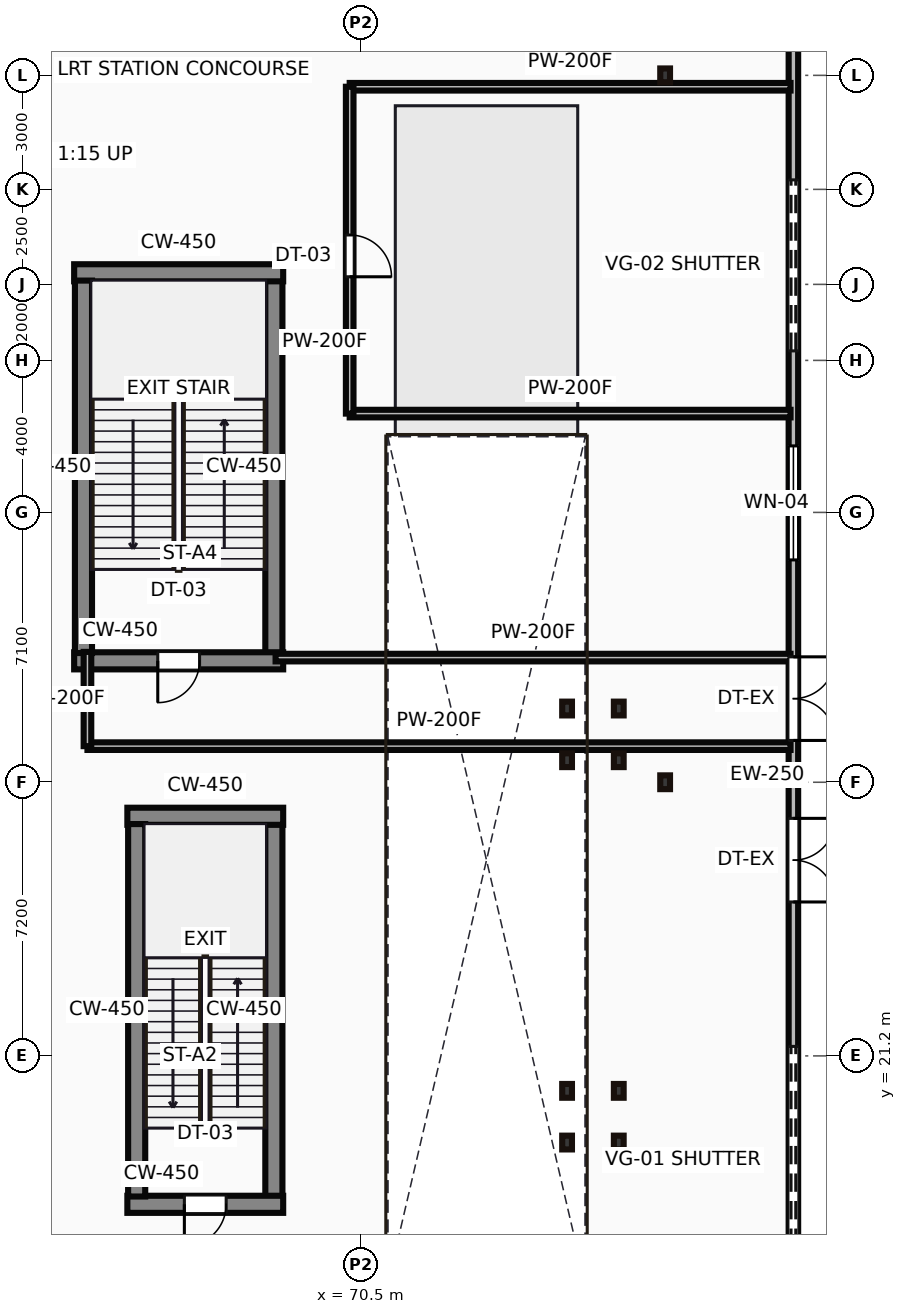
"""IFC4 building model, lengths in metres.
Left out: names, types, materials, properties, quantities, classifications, styles, units other than length and angle.
Written with IfcOpenShell. Run it as: python <this file> out.ifc"""

import sys

from ifc_helpers import new_model, si_unit, direction, frame, frame_2d, origin, origin_2d, place, context, subcontext, project, spatial, rectangle, i_section, extrude, source, transform, mapped, element, fill, save


model = new_model("IFC4")
c1 = context("Model", 3, precision=1e-05, world=origin(), true_north=direction((0.0, 1.0)))
c2 = subcontext(c1, "Body", "Model", "MODEL_VIEW")
j1 = project(units=[si_unit("LENGTHUNIT", "METRE"), si_unit("PLANEANGLEUNIT", "RADIAN")], contexts=[c1])
p1 = place(None, origin())
s1 = spatial("IfcSite", under=j1, at=p1, CompositionType="ELEMENT")
p2 = place(p1, origin())
s2 = spatial("IfcBuilding", under=s1, at=p2, CompositionType="ELEMENT")
p3 = place(p2, origin())
s3 = spatial("IfcBuildingStorey", under=s2, at=p3, CompositionType="ELEMENT", Elevation=0.0)
m1 = source(origin(), c2, "Body", "SweptSolid", [
    extrude(i_section(OverallWidth=0.257, OverallDepth=0.363, WebThickness=0.013, FlangeThickness=0.022, at=origin_2d()), origin(), (0.0, 0.0, 1.0), 6.0),
])
for number, where, z_axis, x_axis in (
    (1, (78.5, 28.4, 0.0), (0.0, 0.0, 1.0), (1.0, 0.0, 0.0)),
    (2, (78.5, 47.0, 0.0), (0.0, 0.0, 1.0), (1.0, 0.0, 0.0)),
):
    element("IfcColumn", number, at=place(p3, frame(where, z_axis=z_axis, x_axis=x_axis)), inside=s3, PredefinedType="COLUMN", context=c2, shape_type="MappedRepresentation", body=[
        mapped(m1, transform((0.0, 0.0, 0.0))),
    ])
m2 = source(origin(), c2, "Body", "SweptSolid", [
    extrude(rectangle(XDim=55.5, YDim=0.25, at=frame_2d((27.75, 0.0))), origin(), (0.0, 0.0, 1.0), 5.7),
])
p4 = place(p3, frame((81.875, 0.25, 0.0), z_axis=(0.0, 0.0, 1.0), x_axis=(0.0, 1.0, 0.0)))
e3 = element("IfcWall", 3, at=p4, inside=s3, PredefinedType="STANDARD", context=c2, shape_type="MappedRepresentation", body=[
    mapped(m2, transform((0.0, 0.0, 0.0))),
])
p5 = place(p4, frame((3.2, 0.0, 0.0)))
e4 = element("IfcOpeningElement", 4, at=p5, cuts=e3, PredefinedType="OPENING", context=c2, shape_type="SweptSolid", body=[
    extrude(rectangle(XDim=2.2, YDim=2.4, at=frame_2d((1.1, 1.2))), frame((0.0, 0.135, 0.0), z_axis=(0.0, -1.0, 0.0), x_axis=(1.0, 0.0, 0.0)), (0.0, 0.0, 1.0), 0.27),
])
p6 = place(p4, frame((7.0, 0.0, 0.0)))
e5 = element("IfcOpeningElement", 5, at=p6, cuts=e3, PredefinedType="OPENING", context=c2, shape_type="SweptSolid", body=[
    extrude(rectangle(XDim=2.2, YDim=2.4, at=frame_2d((1.1, 1.2))), frame((0.0, 0.135, 0.0), z_axis=(0.0, -1.0, 0.0), x_axis=(1.0, 0.0, 0.0)), (0.0, 0.0, 1.0), 0.27),
])
p7 = place(p4, frame((11.8, 0.0, 0.0)))
e6 = element("IfcOpeningElement", 6, at=p7, cuts=e3, PredefinedType="OPENING", context=c2, shape_type="SweptSolid", body=[
    extrude(rectangle(XDim=2.2, YDim=2.4, at=frame_2d((1.1, 1.2))), frame((0.0, 0.135, 0.0), z_axis=(0.0, -1.0, 0.0), x_axis=(1.0, 0.0, 0.0)), (0.0, 0.0, 1.0), 0.27),
])
p8 = place(p4, frame((25.0, 0.0, 0.0)))
e7 = element("IfcOpeningElement", 7, at=p8, cuts=e3, PredefinedType="OPENING", context=c2, shape_type="SweptSolid", body=[
    extrude(rectangle(XDim=2.2, YDim=2.4, at=frame_2d((1.1, 1.2))), frame((0.0, 0.135, 0.0), z_axis=(0.0, -1.0, 0.0), x_axis=(1.0, 0.0, 0.0)), (0.0, 0.0, 1.0), 0.27),
])
p9 = place(p4, frame((29.25, 0.0, 0.0)))
e8 = element("IfcOpeningElement", 8, at=p9, cuts=e3, PredefinedType="OPENING", context=c2, shape_type="SweptSolid", body=[
    extrude(rectangle(XDim=2.2, YDim=2.4, at=frame_2d((1.1, 1.2))), frame((0.0, 0.135, 0.0), z_axis=(0.0, -1.0, 0.0), x_axis=(1.0, 0.0, 0.0)), (0.0, 0.0, 1.0), 0.27),
])
p10 = place(p4, frame((47.6, 0.0, 0.0)))
e9 = element("IfcOpeningElement", 9, at=p10, cuts=e3, PredefinedType="OPENING", context=c2, shape_type="SweptSolid", body=[
    extrude(rectangle(XDim=2.2, YDim=2.4, at=frame_2d((1.1, 1.2))), frame((0.0, 0.135, 0.0), z_axis=(0.0, -1.0, 0.0), x_axis=(1.0, 0.0, 0.0)), (0.0, 0.0, 1.0), 0.27),
])
p11 = place(p4, frame((51.2, 0.0, 0.0)))
e10 = element("IfcOpeningElement", 10, at=p11, cuts=e3, PredefinedType="OPENING", context=c2, shape_type="SweptSolid", body=[
    extrude(rectangle(XDim=2.2, YDim=2.4, at=frame_2d((1.1, 1.2))), frame((0.0, 0.135, 0.0), z_axis=(0.0, -1.0, 0.0), x_axis=(1.0, 0.0, 0.0)), (0.0, 0.0, 1.0), 0.27),
])
p12 = place(p4, frame((15.2, 0.0, 0.0)))
e11 = element("IfcOpeningElement", 11, at=p12, cuts=e3, PredefinedType="OPENING", context=c2, shape_type="SweptSolid", body=[
    extrude(rectangle(XDim=6.0, YDim=4.5, at=frame_2d((3.0, 2.25))), frame((0.0, 0.135, 0.0), z_axis=(0.0, -1.0, 0.0), x_axis=(1.0, 0.0, 0.0)), (0.0, 0.0, 1.0), 0.27),
])
p13 = place(p4, frame((39.5, 0.0, 0.0)))
e12 = element("IfcOpeningElement", 12, at=p13, cuts=e3, PredefinedType="OPENING", context=c2, shape_type="SweptSolid", body=[
    extrude(rectangle(XDim=4.5, YDim=4.2, at=frame_2d((2.25, 2.1))), frame((0.0, 0.135, 0.0), z_axis=(0.0, -1.0, 0.0), x_axis=(1.0, 0.0, 0.0)), (0.0, 0.0, 1.0), 0.27),
])
p14 = place(p4, frame((34.0, 0.0, 0.9)))
e13 = element("IfcOpeningElement", 13, at=p14, cuts=e3, PredefinedType="OPENING", context=c2, shape_type="SweptSolid", body=[
    extrude(rectangle(XDim=3.0, YDim=2.4, at=frame_2d((1.5, 1.2))), frame((0.0, 0.135, 0.0), z_axis=(0.0, -1.0, 0.0), x_axis=(1.0, 0.0, 0.0)), (0.0, 0.0, 1.0), 0.27),
])
m3 = source(origin(), c2, "Body", "SweptSolid", [
    extrude(rectangle(XDim=4.1, YDim=0.45, at=frame_2d((2.05, 0.0))), origin(), (0.0, 0.0, 1.0), 6.0),
])
p15 = place(p3, frame((64.35, 17.295, 0.0), z_axis=(0.0, 0.0, 1.0), x_axis=(1.0, 0.0, 0.0)))
e14 = element("IfcWall", 14, at=p15, inside=s3, PredefinedType="SHEAR", context=c2, shape_type="MappedRepresentation", body=[
    mapped(m3, transform((0.0, 0.0, 0.0))),
])
p16 = place(p15, frame((1.5, 0.0, 0.0)))
e15 = element("IfcOpeningElement", 15, at=p16, cuts=e14, PredefinedType="OPENING", context=c2, shape_type="SweptSolid", body=[
    extrude(rectangle(XDim=1.1, YDim=2.15, at=frame_2d((0.55, 1.075))), frame((0.0, 0.235, 0.0), z_axis=(0.0, -1.0, 0.0), x_axis=(1.0, 0.0, 0.0)), (0.0, 0.0, 1.0), 0.47),
])
m4 = source(origin(), c2, "Body", "SweptSolid", [
    extrude(rectangle(XDim=9.8, YDim=0.45, at=frame_2d((4.9, 0.0))), origin(), (0.0, 0.0, 1.0), 6.0),
])
for number, where, z_axis, x_axis in (
    (16, (64.595, 17.5, 0.0), (0.0, 0.0, 1.0), (0.0, 1.0, 0.0)),
    (17, (68.205, 17.5, 0.0), (0.0, 0.0, 1.0), (0.0, 1.0, 0.0)),
):
    element("IfcWall", number, at=place(p3, frame(where, z_axis=z_axis, x_axis=x_axis)), inside=s3, PredefinedType="SHEAR", context=c2, shape_type="MappedRepresentation", body=[
        mapped(m4, transform((0.0, 0.0, 0.0))),
    ])
p17 = place(p3, frame((64.35, 27.505, 0.0), z_axis=(0.0, 0.0, 1.0), x_axis=(1.0, 0.0, 0.0)))
e18 = element("IfcWall", 18, at=p17, inside=s3, PredefinedType="SHEAR", context=c2, shape_type="MappedRepresentation", body=[
    mapped(m3, transform((0.0, 0.0, 0.0))),
])
m5 = source(origin(), c2, "Body", "SweptSolid", [
    extrude(rectangle(XDim=5.5, YDim=0.45, at=frame_2d((2.75, 0.0))), origin(), (0.0, 0.0, 1.0), 6.0),
])
p18 = place(p3, frame((62.95, 31.595, 0.0), z_axis=(0.0, 0.0, 1.0), x_axis=(1.0, 0.0, 0.0)))
e19 = element("IfcWall", 19, at=p18, inside=s3, PredefinedType="SHEAR", context=c2, shape_type="MappedRepresentation", body=[
    mapped(m5, transform((0.0, 0.0, 0.0))),
])
p19 = place(p18, frame((2.2, 0.0, 0.0)))
e20 = element("IfcOpeningElement", 20, at=p19, cuts=e19, PredefinedType="OPENING", context=c2, shape_type="SweptSolid", body=[
    extrude(rectangle(XDim=1.1, YDim=2.15, at=frame_2d((0.55, 1.075))), frame((0.0, 0.235, 0.0), z_axis=(0.0, -1.0, 0.0), x_axis=(1.0, 0.0, 0.0)), (0.0, 0.0, 1.0), 0.47),
])
for number, where, z_axis, x_axis in (
    (21, (63.195, 31.8, 0.0), (0.0, 0.0, 1.0), (0.0, 1.0, 0.0)),
    (22, (68.205, 31.8, 0.0), (0.0, 0.0, 1.0), (0.0, 1.0, 0.0)),
):
    element("IfcWall", number, at=place(p3, frame(where, z_axis=z_axis, x_axis=x_axis)), inside=s3, PredefinedType="SHEAR", context=c2, shape_type="MappedRepresentation", body=[
        mapped(m4, transform((0.0, 0.0, 0.0))),
    ])
p20 = place(p3, frame((62.95, 41.805, 0.0), z_axis=(0.0, 0.0, 1.0), x_axis=(1.0, 0.0, 0.0)))
e23 = element("IfcWall", 23, at=p20, inside=s3, PredefinedType="SHEAR", context=c2, shape_type="MappedRepresentation", body=[
    mapped(m5, transform((0.0, 0.0, 0.0))),
])
m6 = source(origin(), c2, "Body", "SweptSolid", [
    extrude(i_section(OverallWidth=0.257, OverallDepth=0.363, WebThickness=0.013, FlangeThickness=0.022, at=origin_2d()), origin(), (0.0, 0.0, 1.0), 5.8),
])
for number, where, z_axis, x_axis in (
    (24, (75.92, 18.92, 0.0), (0.0, 0.0, 1.0), (1.0, 0.0, 0.0)),
    (25, (75.92, 20.28, 0.0), (0.0, 0.0, 1.0), (1.0, 0.0, 0.0)),
    (26, (77.28, 18.92, 0.0), (0.0, 0.0, 1.0), (1.0, 0.0, 0.0)),
    (27, (77.28, 20.28, 0.0), (0.0, 0.0, 1.0), (1.0, 0.0, 0.0)),
):
    element("IfcColumn", number, at=place(p3, frame(where, z_axis=z_axis, x_axis=x_axis)), inside=s3, PredefinedType="COLUMN", context=c2, shape_type="MappedRepresentation", body=[
        mapped(m6, transform((0.0, 0.0, 0.0))),
    ])
for number, where, z_axis, x_axis in (
    (28, (75.92, 28.98, 0.0), (0.0, 0.0, 1.0), (1.0, 0.0, 0.0)),
    (29, (75.92, 30.34, 0.0), (0.0, 0.0, 1.0), (1.0, 0.0, 0.0)),
    (30, (77.28, 28.98, 0.0), (0.0, 0.0, 1.0), (1.0, 0.0, 0.0)),
    (31, (77.28, 30.34, 0.0), (0.0, 0.0, 1.0), (1.0, 0.0, 0.0)),
):
    element("IfcColumn", number, at=place(p3, frame(where, z_axis=z_axis, x_axis=x_axis)), inside=s3, PredefinedType="COLUMN", context=c2, shape_type="MappedRepresentation", body=[
        mapped(m1, transform((0.0, 0.0, 0.0))),
    ])
m7 = source(origin(), c2, "Body", "SweptSolid", [
    extrude(rectangle(XDim=18.5, YDim=0.2, at=frame_2d((9.25, 0.0))), origin(), (0.0, 0.0, 1.0), 5.7),
])
p21 = place(p3, frame((63.3, 29.35, 0.0), z_axis=(0.0, 0.0, 1.0), x_axis=(1.0, 0.0, 0.0)))
e32 = element("IfcWall", 32, at=p21, inside=s3, PredefinedType="PARTITIONING", context=c2, shape_type="MappedRepresentation", body=[
    mapped(m7, transform((0.0, 0.0, 0.0))),
])
m8 = source(origin(), c2, "Body", "SweptSolid", [
    extrude(rectangle(XDim=2.48, YDim=0.2, at=frame_2d((1.24, 0.0))), origin(), (0.0, 0.0, 1.0), 5.7),
])
p22 = place(p3, frame((63.3, 29.35, 0.0), z_axis=(0.0, 0.0, 1.0), x_axis=(0.0, 1.0, 0.0)))
e33 = element("IfcWall", 33, at=p22, inside=s3, PredefinedType="PARTITIONING", context=c2, shape_type="MappedRepresentation", body=[
    mapped(m8, transform((0.0, 0.0, 0.0))),
])
m9 = source(origin(), c2, "Body", "SweptSolid", [
    extrude(rectangle(XDim=13.55, YDim=0.2, at=frame_2d((6.775, 0.0))), origin(), (0.0, 0.0, 1.0), 5.7),
])
p23 = place(p3, frame((68.25, 31.68, 0.0), z_axis=(0.0, 0.0, 1.0), x_axis=(1.0, 0.0, 0.0)))
e34 = element("IfcWall", 34, at=p23, inside=s3, PredefinedType="PARTITIONING", context=c2, shape_type="MappedRepresentation", body=[
    mapped(m9, transform((0.0, 0.0, 0.0))),
])
m10 = source(origin(), c2, "Body", "SweptSolid", [
    extrude(rectangle(XDim=8.6, YDim=0.2, at=frame_2d((4.3, 0.0))), origin(), (0.0, 0.0, 1.0), 5.7),
])
p24 = place(p3, frame((70.2, 38.1, 0.0), z_axis=(0.0, 0.0, 1.0), x_axis=(0.0, 1.0, 0.0)))
e35 = element("IfcWall", 35, at=p24, inside=s3, PredefinedType="PARTITIONING", context=c2, shape_type="MappedRepresentation", body=[
    mapped(m10, transform((0.0, 0.0, 0.0))),
])
p25 = place(p24, frame((3.6, 0.0, 0.0)))
e36 = element("IfcOpeningElement", 36, at=p25, cuts=e35, PredefinedType="OPENING", context=c2, shape_type="SweptSolid", body=[
    extrude(rectangle(XDim=1.1, YDim=2.15, at=frame_2d((0.55, 1.075))), frame((0.0, 0.11, 0.0), z_axis=(0.0, -1.0, 0.0), x_axis=(1.0, 0.0, 0.0)), (0.0, 0.0, 1.0), 0.22),
])
m11 = source(origin(), c2, "Body", "SweptSolid", [
    extrude(rectangle(XDim=11.6, YDim=0.2, at=frame_2d((5.8, 0.0))), origin(), (0.0, 0.0, 1.0), 5.7),
])
for number, where, z_axis, x_axis in (
    (37, (70.2, 38.1, 0.0), (0.0, 0.0, 1.0), (1.0, 0.0, 0.0)),
    (38, (70.2, 46.7, 0.0), (0.0, 0.0, 1.0), (1.0, 0.0, 0.0)),
):
    element("IfcWall", number, at=place(p3, frame(where, z_axis=z_axis, x_axis=x_axis)), inside=s3, PredefinedType="PARTITIONING", context=c2, shape_type="MappedRepresentation", body=[
        mapped(m11, transform((0.0, 0.0, 0.0))),
    ])
m12 = source(origin(), c2, "Body", "SweptSolid", [
    extrude(rectangle(XDim=2.2, YDim=2.4, at=frame_2d((1.1, 1.2))), frame((0.0, 0.025, 0.0), z_axis=(0.0, -1.0, 0.0), x_axis=(1.0, 0.0, 0.0)), (0.0, 0.0, 1.0), 0.05),
])
p26 = place(p8, frame((2.2, 0.0, 0.0), z_axis=(0.0, 0.0, 1.0), x_axis=(-1.0, 0.0, 0.0)))
e39 = element("IfcDoor", 39, at=p26, inside=s3, OperationType="DOUBLE_DOOR_SINGLE_SWING", PredefinedType="DOOR", context=c2, shape_type="MappedRepresentation", body=[
    mapped(m12, transform((0.0, 0.0, 0.0))),
])
fill(e7, e39)
p27 = place(p9, frame((2.2, 0.0, 0.0), z_axis=(0.0, 0.0, 1.0), x_axis=(-1.0, 0.0, 0.0)))
e40 = element("IfcDoor", 40, at=p27, inside=s3, OperationType="DOUBLE_DOOR_SINGLE_SWING", PredefinedType="DOOR", context=c2, shape_type="MappedRepresentation", body=[
    mapped(m12, transform((0.0, 0.0, 0.0))),
])
fill(e8, e40)
m13 = source(origin(), c2, "Body", "SweptSolid", [
    extrude(rectangle(XDim=6.0, YDim=4.5, at=frame_2d((3.0, 2.25))), frame((0.0, 0.025, 0.0), z_axis=(0.0, -1.0, 0.0), x_axis=(1.0, 0.0, 0.0)), (0.0, 0.0, 1.0), 0.05),
])
p28 = place(p12, frame((6.0, 0.0, 0.0), z_axis=(0.0, 0.0, 1.0), x_axis=(-1.0, 0.0, 0.0)))
e41 = element("IfcDoor", 41, at=p28, inside=s3, OperationType="ROLLINGUP", PredefinedType="GATE", context=c2, shape_type="MappedRepresentation", body=[
    mapped(m13, transform((0.0, 0.0, 0.0))),
])
fill(e11, e41)
m14 = source(origin(), c2, "Body", "SweptSolid", [
    extrude(rectangle(XDim=4.5, YDim=4.2, at=frame_2d((2.25, 2.1))), frame((0.0, 0.025, 0.0), z_axis=(0.0, -1.0, 0.0), x_axis=(1.0, 0.0, 0.0)), (0.0, 0.0, 1.0), 0.05),
])
p29 = place(p13, frame((4.5, 0.0, 0.0), z_axis=(0.0, 0.0, 1.0), x_axis=(-1.0, 0.0, 0.0)))
e42 = element("IfcDoor", 42, at=p29, inside=s3, OperationType="ROLLINGUP", PredefinedType="GATE", context=c2, shape_type="MappedRepresentation", body=[
    mapped(m14, transform((0.0, 0.0, 0.0))),
])
fill(e12, e42)
m15 = source(origin(), c2, "Body", "SweptSolid", [
    extrude(rectangle(XDim=3.0, YDim=2.4, at=frame_2d((1.5, 1.2))), frame((0.0, 0.03, 0.0), z_axis=(0.0, -1.0, 0.0), x_axis=(1.0, 0.0, 0.0)), (0.0, 0.0, 1.0), 0.06),
])
p30 = place(p14, origin())
e43 = element("IfcWindow", 43, at=p30, inside=s3, PartitioningType="SINGLE_PANEL", PredefinedType="WINDOW", context=c2, shape_type="MappedRepresentation", body=[
    mapped(m15, transform((0.0, 0.0, 0.0))),
])
fill(e13, e43)
m16 = source(origin(), c2, "Body", "SweptSolid", [
    extrude(rectangle(XDim=1.1, YDim=2.15, at=frame_2d((0.55, 1.075))), frame((0.0, 0.025, 0.0), z_axis=(0.0, -1.0, 0.0), x_axis=(1.0, 0.0, 0.0)), (0.0, 0.0, 1.0), 0.05),
])
p31 = place(p25, frame((1.1, 0.0, 0.0), z_axis=(0.0, 0.0, 1.0), x_axis=(-1.0, 0.0, 0.0)))
e44 = element("IfcDoor", 44, at=p31, inside=s3, OperationType="SINGLE_SWING_LEFT", PredefinedType="DOOR", context=c2, shape_type="MappedRepresentation", body=[
    mapped(m16, transform((0.0, 0.0, 0.0))),
])
fill(e36, e44)
p32 = place(p16, frame((1.1, 0.0, 0.0), z_axis=(0.0, 0.0, 1.0), x_axis=(-1.0, 0.0, 0.0)))
e45 = element("IfcDoor", 45, at=p32, inside=s3, OperationType="SINGLE_SWING_LEFT", PredefinedType="DOOR", context=c2, shape_type="MappedRepresentation", body=[
    mapped(m16, transform((0.0, 0.0, 0.0))),
])
fill(e15, e45)
p33 = place(p19, frame((1.1, 0.0, 0.0), z_axis=(0.0, 0.0, 1.0), x_axis=(-1.0, 0.0, 0.0)))
e46 = element("IfcDoor", 46, at=p33, inside=s3, OperationType="SINGLE_SWING_LEFT", PredefinedType="DOOR", context=c2, shape_type="MappedRepresentation", body=[
    mapped(m16, transform((0.0, 0.0, 0.0))),
])
fill(e20, e46)
save(model, sys.argv[1])
